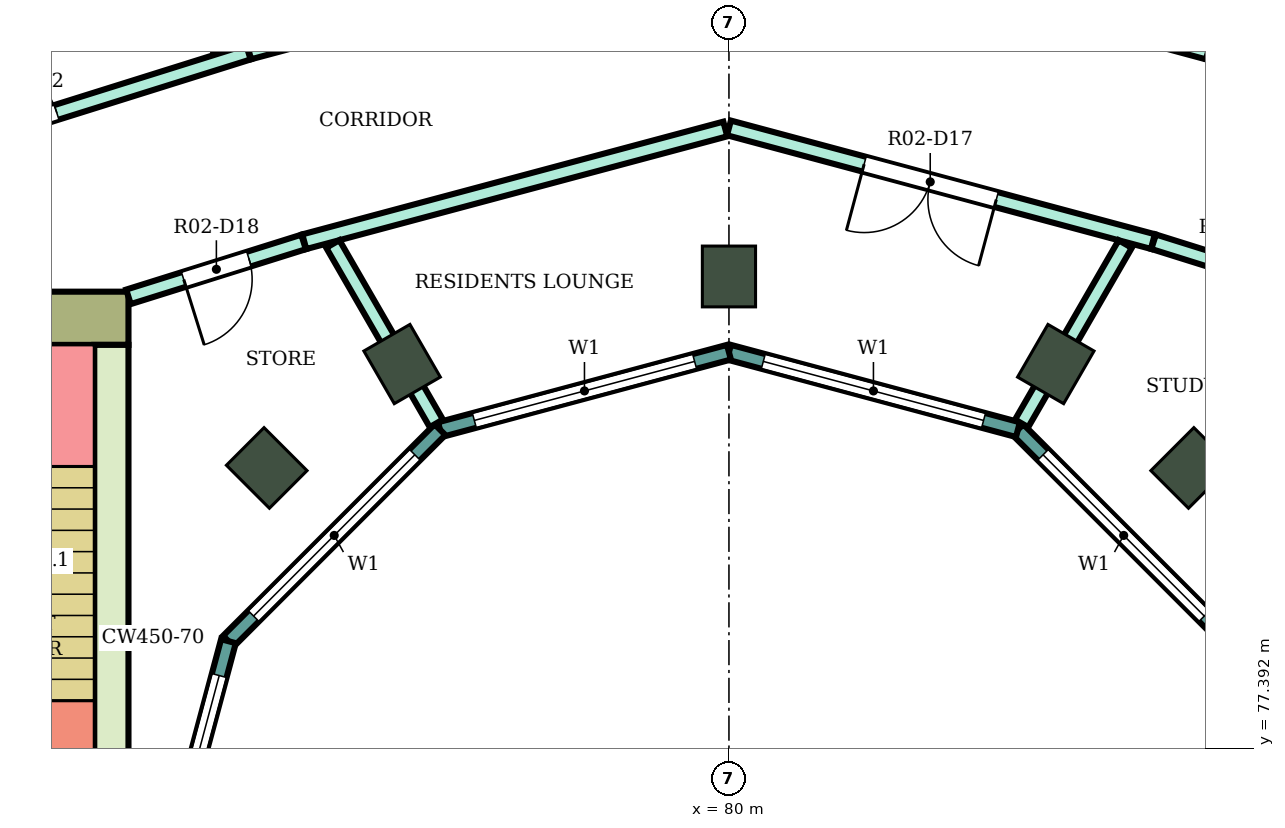
"""IFC4 building model, lengths in metres.
Left out: names, types, materials, properties, quantities, classifications, styles, units other than length and angle.
Written with IfcOpenShell. Run it as: python <this file> out.ifc"""

import sys

from ifc_helpers import new_model, si_unit, direction, frame, frame_2d, origin, origin_2d, place, context, subcontext, project, spatial, rectangle, extrude, element, fill, save


model = new_model("IFC4")
c1 = context("Model", 3, precision=1e-05, world=origin(), true_north=direction((0.0, 1.0)))
c2 = subcontext(c1, "Body", "Model", "MODEL_VIEW")
j1 = project(units=[si_unit("LENGTHUNIT", "METRE"), si_unit("PLANEANGLEUNIT", "RADIAN")], contexts=[c1])
p1 = place(None, origin())
s1 = spatial("IfcSite", under=j1, at=p1, CompositionType="ELEMENT")
p2 = place(p1, origin())
s2 = spatial("IfcBuilding", under=s1, at=p2, CompositionType="ELEMENT")
p3 = place(p2, frame((0.0, 0.0, 170.0)))
s3 = spatial("IfcBuildingStorey", under=s2, at=p3, CompositionType="ELEMENT", Elevation=170.0)
for number, where, z_axis, x_axis in (
    (1, (86.081, 81.081, 0.0), (0.0, 0.0, 1.0), (0.707, 0.707, 0.0)),
    (2, (84.3, 82.448, 0.0), (0.0, 0.0, 1.0), (0.5, 0.866, 0.0)),
    (3, (80.0, 83.6, 0.0), (0.0, 0.0, 1.0), (0.0, 1.0, 0.0)),
    (4, (75.7, 82.448, 0.0), (0.0, 0.0, 1.0), (-0.5, 0.866, 0.0)),
    (5, (73.919, 81.081, 0.0), (0.0, 0.0, 1.0), (-0.707, 0.707, 0.0)),
):
    element("IfcColumn", number, at=place(p3, frame(where, z_axis=z_axis, x_axis=x_axis)), inside=s3, PredefinedType="COLUMN", context=c2, shape_type="SweptSolid", body=[
        extrude(rectangle(XDim=0.8, YDim=0.7, at=origin_2d()), origin(), (0.0, 0.0, 1.0), 4.1),
    ])
p4 = place(p3, frame((72.1, 83.05, 0.0), z_axis=(0.0, 0.0, 1.0), x_axis=(-1.0, 0.0, 0.0)))
e6 = element("IfcWall", 6, at=p4, inside=s3, PredefinedType="SHEAR", context=c2, shape_type="SweptSolid", body=[
    extrude(rectangle(XDim=14.8, YDim=0.7, at=frame_2d((7.4, 0.0))), origin(), (0.0, 0.0, 1.0), 3.78),
])
p5 = place(p4, frame((4.2, 0.0, 0.0)))
e7 = element("IfcOpeningElement", 7, at=p5, cuts=e6, PredefinedType="OPENING", context=c2, shape_type="SweptSolid", body=[
    extrude(rectangle(XDim=2.4, YDim=2.4, at=frame_2d((1.2, 1.2))), frame((0.0, 0.36, 0.0), z_axis=(0.0, -1.0, 0.0), x_axis=(1.0, 0.0, 0.0)), (0.0, 0.0, 1.0), 0.72),
])
p6 = place(p3, frame((71.875, 82.7, 0.0), z_axis=(0.0, 0.0, 1.0), x_axis=(0.0, -1.0, 0.0)))
e8 = element("IfcWall", 8, at=p6, inside=s3, PredefinedType="SHEAR", context=c2, shape_type="SweptSolid", body=[
    extrude(rectangle(XDim=7.7, YDim=0.45, at=frame_2d((3.85, 0.0))), origin(), (0.0, 0.0, 1.0), 3.78),
])
p7 = place(p3, frame((86.585, 78.802, 0.0), z_axis=(0.0, 0.0, 1.0), x_axis=(-0.707106781187, 0.707106781187, 0.0)))
e9 = element("IfcWall", 9, at=p7, inside=s3, PredefinedType="NOTDEFINED", context=c2, shape_type="SweptSolid", body=[
    extrude(rectangle(XDim=3.936, YDim=0.2, at=frame_2d((1.968, 0.0))), origin(), (0.0, 0.0, 1.0), 4.1),
])
p8 = place(p7, frame((0.468, 0.0, 0.9)))
e10 = element("IfcOpeningElement", 10, at=p8, cuts=e9, PredefinedType="OPENING", context=c2, shape_type="SweptSolid", body=[
    extrude(rectangle(XDim=3.0, YDim=2.3, at=frame_2d((1.5, 1.15))), frame((0.0, 0.11, 0.0), z_axis=(0.0, -1.0, 0.0), x_axis=(1.0, 0.0, 0.0)), (0.0, 0.0, 1.0), 0.22),
])
p9 = place(p3, frame((83.802, 81.585, 0.0), z_axis=(0.0, 0.0, 1.0), x_axis=(-0.965933654434, 0.258789828301, 0.0)))
e11 = element("IfcWall", 11, at=p9, inside=s3, PredefinedType="NOTDEFINED", context=c2, shape_type="SweptSolid", body=[
    extrude(rectangle(XDim=3.936, YDim=0.2, at=frame_2d((1.968, 0.0))), origin(), (0.0, 0.0, 1.0), 4.1),
])
p10 = place(p9, frame((0.468, 0.0, 0.9)))
e12 = element("IfcOpeningElement", 12, at=p10, cuts=e11, PredefinedType="OPENING", context=c2, shape_type="SweptSolid", body=[
    extrude(rectangle(XDim=3.0, YDim=2.3, at=frame_2d((1.5, 1.15))), frame((0.0, 0.11, 0.0), z_axis=(0.0, -1.0, 0.0), x_axis=(1.0, 0.0, 0.0)), (0.0, 0.0, 1.0), 0.22),
])
p11 = place(p3, frame((80.0, 82.604, 0.0), z_axis=(0.0, 0.0, 1.0), x_axis=(-0.965933654434, -0.258789828301, 0.0)))
e13 = element("IfcWall", 13, at=p11, inside=s3, PredefinedType="NOTDEFINED", context=c2, shape_type="SweptSolid", body=[
    extrude(rectangle(XDim=3.936, YDim=0.2, at=frame_2d((1.968, 0.0))), origin(), (0.0, 0.0, 1.0), 4.1),
])
p12 = place(p11, frame((0.468, 0.0, 0.9)))
e14 = element("IfcOpeningElement", 14, at=p12, cuts=e13, PredefinedType="OPENING", context=c2, shape_type="SweptSolid", body=[
    extrude(rectangle(XDim=3.0, YDim=2.3, at=frame_2d((1.5, 1.15))), frame((0.0, 0.11, 0.0), z_axis=(0.0, -1.0, 0.0), x_axis=(1.0, 0.0, 0.0)), (0.0, 0.0, 1.0), 0.22),
])
p13 = place(p3, frame((76.198, 81.585, 0.0), z_axis=(0.0, 0.0, 1.0), x_axis=(-0.707106781187, -0.707106781187, 0.0)))
e15 = element("IfcWall", 15, at=p13, inside=s3, PredefinedType="NOTDEFINED", context=c2, shape_type="SweptSolid", body=[
    extrude(rectangle(XDim=3.936, YDim=0.2, at=frame_2d((1.968, 0.0))), origin(), (0.0, 0.0, 1.0), 4.1),
])
p14 = place(p13, frame((0.468, 0.0, 0.9)))
e16 = element("IfcOpeningElement", 16, at=p14, cuts=e15, PredefinedType="OPENING", context=c2, shape_type="SweptSolid", body=[
    extrude(rectangle(XDim=3.0, YDim=2.3, at=frame_2d((1.5, 1.15))), frame((0.0, 0.11, 0.0), z_axis=(0.0, -1.0, 0.0), x_axis=(1.0, 0.0, 0.0)), (0.0, 0.0, 1.0), 0.22),
])
p15 = place(p3, frame((73.415, 78.802, 0.0), z_axis=(0.0, 0.0, 1.0), x_axis=(-0.258789828301, -0.965933654434, 0.0)))
e17 = element("IfcWall", 17, at=p15, inside=s3, PredefinedType="NOTDEFINED", context=c2, shape_type="SweptSolid", body=[
    extrude(rectangle(XDim=3.936, YDim=0.2, at=frame_2d((1.968, 0.0))), origin(), (0.0, 0.0, 1.0), 4.1),
])
p16 = place(p15, frame((0.468, 0.0, 0.9)))
e18 = element("IfcOpeningElement", 18, at=p16, cuts=e17, PredefinedType="OPENING", context=c2, shape_type="SweptSolid", body=[
    extrude(rectangle(XDim=3.0, YDim=2.3, at=frame_2d((1.5, 1.15))), frame((0.0, 0.11, 0.0), z_axis=(0.0, -1.0, 0.0), x_axis=(1.0, 0.0, 0.0)), (0.0, 0.0, 1.0), 0.22),
])
p17 = place(p3, frame((67.104, 97.343, 0.0), z_axis=(0.0, 0.0, 1.0), x_axis=(0.499841888023, -0.866116670534, 0.0)))
e19 = element("IfcWall", 19, at=p17, inside=s3, PredefinedType="PARTITIONING", context=c2, shape_type="SweptSolid", body=[
    extrude(rectangle(XDim=12.446, YDim=0.2, at=frame_2d((6.223, 0.0))), origin(), (0.0, 0.0, 1.0), 3.65),
])
p18 = place(p3, frame((68.2, 84.833, 0.0), z_axis=(0.0, 0.0, 1.0), x_axis=(0.954191968402, 0.299195065863, 0.0)))
e20 = element("IfcWall", 20, at=p18, inside=s3, PredefinedType="PARTITIONING", context=c2, shape_type="SweptSolid", body=[
    extrude(rectangle(XDim=5.74, YDim=0.2, at=frame_2d((2.87, 0.0))), origin(), (0.0, 0.0, 1.0), 3.65),
])
p19 = place(p18, frame((2.097, 0.0, 0.0)))
e21 = element("IfcOpeningElement", 21, at=p19, cuts=e20, PredefinedType="OPENING", context=c2, shape_type="SweptSolid", body=[
    extrude(rectangle(XDim=1.0, YDim=2.1, at=frame_2d((0.5, 1.05))), frame((0.0, 0.11, 0.0), z_axis=(0.0, -1.0, 0.0), x_axis=(1.0, 0.0, 0.0)), (0.0, 0.0, 1.0), 0.22),
])
p20 = place(p3, frame((72.1, 83.332, 0.0), z_axis=(0.0, 0.0, 1.0), x_axis=(0.954233106619, 0.299063836383, 0.0)))
e22 = element("IfcWall", 22, at=p20, inside=s3, PredefinedType="PARTITIONING", context=c2, shape_type="SweptSolid", body=[
    extrude(rectangle(XDim=2.414, YDim=0.2, at=frame_2d((1.207, 0.0))), origin(), (0.0, 0.0, 1.0), 3.65),
])
p21 = place(p20, frame((0.762, 0.0, 0.0)))
e23 = element("IfcOpeningElement", 23, at=p21, cuts=e22, PredefinedType="OPENING", context=c2, shape_type="SweptSolid", body=[
    extrude(rectangle(XDim=0.9, YDim=2.1, at=frame_2d((0.45, 1.05))), frame((0.0, 0.11, 0.0), z_axis=(0.0, -1.0, 0.0), x_axis=(1.0, 0.0, 0.0)), (0.0, 0.0, 1.0), 0.22),
])
p22 = place(p3, frame((73.687, 86.554, 0.0), z_axis=(0.0, 0.0, 1.0), x_axis=(0.96595928904, 0.258694128106, 0.0)))
e24 = element("IfcWall", 24, at=p22, inside=s3, PredefinedType="PARTITIONING", context=c2, shape_type="SweptSolid", body=[
    extrude(rectangle(XDim=6.496, YDim=0.2, at=frame_2d((3.248, 0.0))), origin(), (0.0, 0.0, 1.0), 3.65),
])
p23 = place(p3, frame((74.413, 84.057, 0.0), z_axis=(0.0, 0.0, 1.0), x_axis=(0.965970849692, 0.258650956976, 0.0)))
e25 = element("IfcWall", 25, at=p23, inside=s3, PredefinedType="PARTITIONING", context=c2, shape_type="SweptSolid", body=[
    extrude(rectangle(XDim=5.734, YDim=0.2, at=frame_2d((2.867, 0.0))), origin(), (0.0, 0.0, 1.0), 3.65),
])
p24 = place(p3, frame((74.788, 84.028, 0.0), z_axis=(0.0, 0.0, 1.0), x_axis=(0.499859501914, -0.866106505198, 0.0)))
e26 = element("IfcWall", 26, at=p24, inside=s3, PredefinedType="PARTITIONING", context=c2, shape_type="SweptSolid", body=[
    extrude(rectangle(XDim=2.724, YDim=0.2, at=frame_2d((1.362, 0.0))), origin(), (0.0, 0.0, 1.0), 3.65),
])
p25 = place(p3, frame((80.0, 85.554, 0.0), z_axis=(0.0, 0.0, 1.0), x_axis=(0.965894438951, -0.258936155845, 0.0)))
e27 = element("IfcWall", 27, at=p25, inside=s3, PredefinedType="PARTITIONING", context=c2, shape_type="SweptSolid", body=[
    extrude(rectangle(XDim=5.774, YDim=0.2, at=frame_2d((2.887, 0.0))), origin(), (0.0, 0.0, 1.0), 3.65),
])
p26 = place(p25, frame((1.841, 0.0, 0.0)))
e28 = element("IfcOpeningElement", 28, at=p26, cuts=e27, PredefinedType="OPENING", context=c2, shape_type="SweptSolid", body=[
    extrude(rectangle(XDim=1.8, YDim=2.1, at=frame_2d((0.9, 1.05))), frame((0.0, 0.11, 0.0), z_axis=(0.0, -1.0, 0.0), x_axis=(1.0, 0.0, 0.0)), (0.0, 0.0, 1.0), 0.22),
])
p27 = place(p3, frame((80.049, 88.237, 0.0), z_axis=(0.0, 0.0, 1.0), x_axis=(0.965582990495, -0.260095152718, 0.0)))
e29 = element("IfcWall", 29, at=p27, inside=s3, PredefinedType="PARTITIONING", context=c2, shape_type="SweptSolid", body=[
    extrude(rectangle(XDim=6.476, YDim=0.2, at=frame_2d((3.238, 0.0))), origin(), (0.0, 0.0, 1.0), 3.65),
])
p28 = place(p27, frame((0.5, 0.0, 0.0)))
e30 = element("IfcOpeningElement", 30, at=p28, cuts=e29, PredefinedType="OPENING", context=c2, shape_type="SweptSolid", body=[
    extrude(rectangle(XDim=1.0, YDim=2.1, at=frame_2d((0.5, 1.05))), frame((0.0, 0.11, 0.0), z_axis=(0.0, -1.0, 0.0), x_axis=(1.0, 0.0, 0.0)), (0.0, 0.0, 1.0), 0.22),
])
p29 = place(p3, frame((83.851, 81.667, 0.0), z_axis=(0.0, 0.0, 1.0), x_axis=(0.500099931433, 0.865967700657, 0.0)))
e31 = element("IfcWall", 31, at=p29, inside=s3, PredefinedType="PARTITIONING", context=c2, shape_type="SweptSolid", body=[
    extrude(rectangle(XDim=2.725, YDim=0.2, at=frame_2d((1.362, 0.0))), origin(), (0.0, 0.0, 1.0), 3.65),
])
p30 = place(p3, frame((85.587, 84.057, 0.0), z_axis=(0.0, 0.0, 1.0), x_axis=(0.954239513179, -0.299043393987, 0.0)))
e32 = element("IfcWall", 32, at=p30, inside=s3, PredefinedType="PARTITIONING", context=c2, shape_type="SweptSolid", body=[
    extrude(rectangle(XDim=2.424, YDim=0.2, at=frame_2d((1.212, 0.0))), origin(), (0.0, 0.0, 1.0), 3.65),
])
p31 = place(p30, frame((0.762, 0.0, 0.0)))
e33 = element("IfcOpeningElement", 33, at=p31, cuts=e32, PredefinedType="OPENING", context=c2, shape_type="SweptSolid", body=[
    extrude(rectangle(XDim=0.9, YDim=2.1, at=frame_2d((0.45, 1.05))), frame((0.0, 0.11, 0.0), z_axis=(0.0, -1.0, 0.0), x_axis=(1.0, 0.0, 0.0)), (0.0, 0.0, 1.0), 0.22),
])
p32 = place(p8, origin())
e34 = element("IfcWindow", 34, at=p32, inside=s3, PartitioningType="SINGLE_PANEL", PredefinedType="WINDOW", context=c2, shape_type="SweptSolid", body=[
    extrude(rectangle(XDim=3.0, YDim=2.3, at=frame_2d((1.5, 1.15))), frame((0.0, 0.03, 0.0), z_axis=(0.0, -1.0, 0.0), x_axis=(1.0, 0.0, 0.0)), (0.0, 0.0, 1.0), 0.06),
])
fill(e10, e34)
p33 = place(p10, origin())
e35 = element("IfcWindow", 35, at=p33, inside=s3, PartitioningType="SINGLE_PANEL", PredefinedType="WINDOW", context=c2, shape_type="SweptSolid", body=[
    extrude(rectangle(XDim=3.0, YDim=2.3, at=frame_2d((1.5, 1.15))), frame((0.0, 0.03, 0.0), z_axis=(0.0, -1.0, 0.0), x_axis=(1.0, 0.0, 0.0)), (0.0, 0.0, 1.0), 0.06),
])
fill(e12, e35)
p34 = place(p12, origin())
e36 = element("IfcWindow", 36, at=p34, inside=s3, PartitioningType="SINGLE_PANEL", PredefinedType="WINDOW", context=c2, shape_type="SweptSolid", body=[
    extrude(rectangle(XDim=3.0, YDim=2.3, at=frame_2d((1.5, 1.15))), frame((0.0, 0.03, 0.0), z_axis=(0.0, -1.0, 0.0), x_axis=(1.0, 0.0, 0.0)), (0.0, 0.0, 1.0), 0.06),
])
fill(e14, e36)
p35 = place(p14, origin())
e37 = element("IfcWindow", 37, at=p35, inside=s3, PartitioningType="SINGLE_PANEL", PredefinedType="WINDOW", context=c2, shape_type="SweptSolid", body=[
    extrude(rectangle(XDim=3.0, YDim=2.3, at=frame_2d((1.5, 1.15))), frame((0.0, 0.03, 0.0), z_axis=(0.0, -1.0, 0.0), x_axis=(1.0, 0.0, 0.0)), (0.0, 0.0, 1.0), 0.06),
])
fill(e16, e37)
p36 = place(p16, origin())
e38 = element("IfcWindow", 38, at=p36, inside=s3, PartitioningType="SINGLE_PANEL", PredefinedType="WINDOW", context=c2, shape_type="SweptSolid", body=[
    extrude(rectangle(XDim=3.0, YDim=2.3, at=frame_2d((1.5, 1.15))), frame((0.0, 0.03, 0.0), z_axis=(0.0, -1.0, 0.0), x_axis=(1.0, 0.0, 0.0)), (0.0, 0.0, 1.0), 0.06),
])
fill(e18, e38)
p37 = place(p19, origin())
e39 = element("IfcDoor", 39, at=p37, inside=s3, OperationType="SINGLE_SWING_LEFT", PredefinedType="DOOR", context=c2, shape_type="SweptSolid", body=[
    extrude(rectangle(XDim=1.0, YDim=2.1, at=frame_2d((0.5, 1.05))), frame((0.0, 0.025, 0.0), z_axis=(0.0, -1.0, 0.0), x_axis=(1.0, 0.0, 0.0)), (0.0, 0.0, 1.0), 0.05),
])
fill(e21, e39)
p38 = place(p26, frame((1.8, 0.0, 0.0), z_axis=(0.0, 0.0, 1.0), x_axis=(-1.0, 0.0, 0.0)))
e40 = element("IfcDoor", 40, at=p38, inside=s3, OperationType="DOUBLE_DOOR_SINGLE_SWING", PredefinedType="DOOR", context=c2, shape_type="SweptSolid", body=[
    extrude(rectangle(XDim=1.8, YDim=2.1, at=frame_2d((0.9, 1.05))), frame((0.0, 0.025, 0.0), z_axis=(0.0, -1.0, 0.0), x_axis=(1.0, 0.0, 0.0)), (0.0, 0.0, 1.0), 0.05),
])
fill(e28, e40)
p39 = place(p21, frame((0.9, 0.0, 0.0), z_axis=(0.0, 0.0, 1.0), x_axis=(-1.0, 0.0, 0.0)))
e41 = element("IfcDoor", 41, at=p39, inside=s3, OperationType="SINGLE_SWING_RIGHT", PredefinedType="DOOR", context=c2, shape_type="SweptSolid", body=[
    extrude(rectangle(XDim=0.9, YDim=2.1, at=frame_2d((0.45, 1.05))), frame((0.0, 0.025, 0.0), z_axis=(0.0, -1.0, 0.0), x_axis=(1.0, 0.0, 0.0)), (0.0, 0.0, 1.0), 0.05),
])
fill(e23, e41)
save(model, sys.argv[1])
